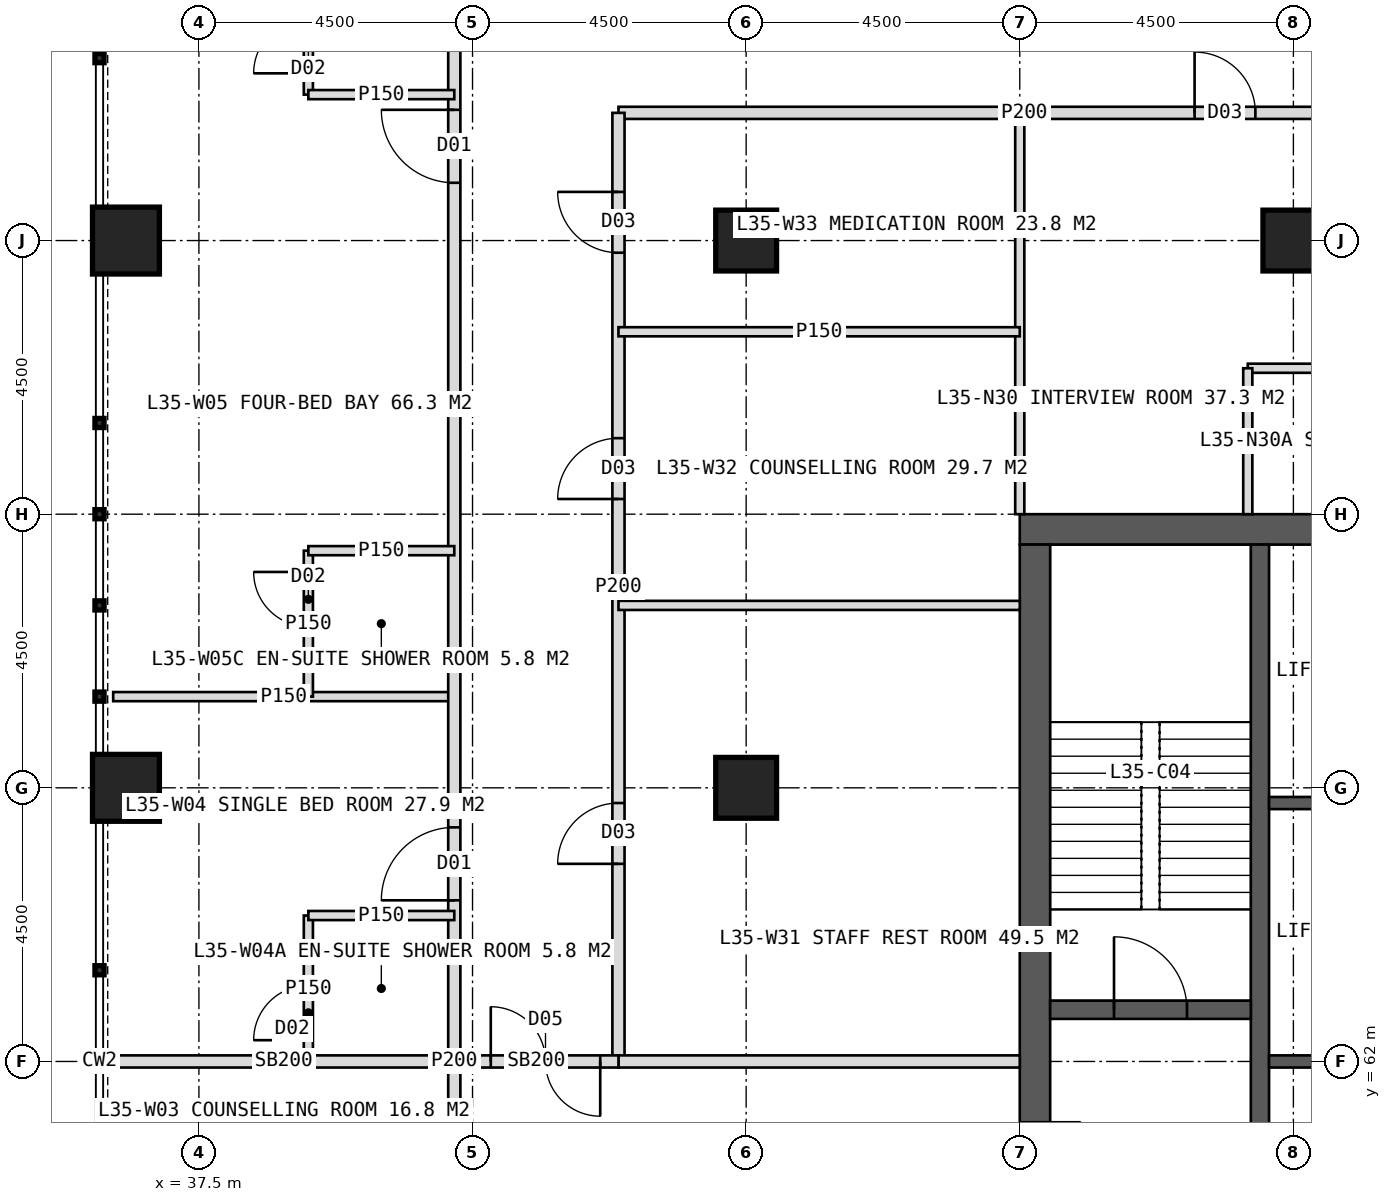
"""IFC4 building model, lengths in metres.
Left out: names, types, materials, properties, quantities, classifications, styles, units other than length and angle.
Written with IfcOpenShell. Run it as: python <this file> out.ifc"""

import sys

from ifc_helpers import new_model, si_unit, direction, frame, frame_2d, origin, origin_2d, place, context, subcontext, project, spatial, rectangle, hollow_rectangle, extrude, element, fill, save


model = new_model("IFC4")
c1 = context("Model", 3, precision=1e-05, world=origin(), true_north=direction((0.0, 1.0)))
c2 = subcontext(c1, "Body", "Model", "MODEL_VIEW")
j1 = project(units=[si_unit("LENGTHUNIT", "METRE"), si_unit("PLANEANGLEUNIT", "RADIAN")], contexts=[c1])
p1 = place(None, origin())
s1 = spatial("IfcSite", under=j1, at=p1, CompositionType="ELEMENT")
p2 = place(p1, origin())
s2 = spatial("IfcBuilding", under=s1, at=p2, CompositionType="ELEMENT")
p3 = place(p2, frame((0.0, 0.0, 148.0)))
s3 = spatial("IfcBuildingStorey", under=s2, at=p3, CompositionType="ELEMENT", Elevation=148.0)
p4 = place(p3, frame((51.0, 70.75, 0.0), z_axis=(0.0, 0.0, 1.0), x_axis=(1.0, 0.0, 0.0)))
e1 = element("IfcWall", 1, at=p4, inside=s3, PredefinedType="SHEAR", context=c2, shape_type="SweptSolid", body=[
    extrude(rectangle(XDim=18.0, YDim=0.5, at=frame_2d((9.0, 0.0))), origin(), (0.0, 0.0, 1.0), 4.0),
])
p5 = place(p4, frame((8.1, 0.0, 0.0)))
e2 = element("IfcOpeningElement", 2, at=p5, cuts=e1, PredefinedType="OPENING", context=c2, shape_type="SweptSolid", body=[
    extrude(rectangle(XDim=1.8, YDim=2.2, at=frame_2d((0.9, 1.1))), frame((0.0, 0.26, 0.0), z_axis=(0.0, -1.0, 0.0), x_axis=(1.0, 0.0, 0.0)), (0.0, 0.0, 1.0), 0.52),
])
p6 = place(p3, frame((51.25, 53.5, 0.0), z_axis=(0.0, 0.0, 1.0), x_axis=(0.0, 1.0, 0.0)))
e3 = element("IfcWall", 3, at=p6, inside=s3, PredefinedType="SHEAR", context=c2, shape_type="SweptSolid", body=[
    extrude(rectangle(XDim=17.0, YDim=0.5, at=frame_2d((8.5, 0.0))), origin(), (0.0, 0.0, 1.0), 4.0),
])
p7 = place(p6, frame((6.0, 0.0, 0.0)))
e4 = element("IfcOpeningElement", 4, at=p7, cuts=e3, PredefinedType="OPENING", context=c2, shape_type="SweptSolid", body=[
    extrude(rectangle(XDim=1.5, YDim=2.2, at=frame_2d((0.75, 1.1))), frame((0.0, 0.26, 0.0), z_axis=(0.0, -1.0, 0.0), x_axis=(1.0, 0.0, 0.0)), (0.0, 0.0, 1.0), 0.52),
])
p8 = place(p3, frame((54.95, 53.5, 0.0), z_axis=(0.0, 0.0, 1.0), x_axis=(0.0, 1.0, 0.0)))
e5 = element("IfcWall", 5, at=p8, inside=s3, PredefinedType="SHEAR", context=c2, shape_type="SweptSolid", body=[
    extrude(rectangle(XDim=17.0, YDim=0.3, at=frame_2d((8.5, 0.0))), origin(), (0.0, 0.0, 1.0), 4.0),
])
for number, where, z_axis, x_axis in (
    (6, (55.1, 62.0, 0.0), (0.0, 0.0, 1.0), (1.0, 0.0, 0.0)),
    (7, (55.1, 66.25, 0.0), (0.0, 0.0, 1.0), (1.0, 0.0, 0.0)),
):
    element("IfcWall", number, at=place(p3, frame(where, z_axis=z_axis, x_axis=x_axis)), inside=s3, PredefinedType="SHEAR", context=c2, shape_type="SweptSolid", body=[
        extrude(rectangle(XDim=3.05, YDim=0.2, at=frame_2d((1.525, 0.0))), origin(), (0.0, 0.0, 1.0), 4.0),
    ])
p9 = place(p3, frame((51.5, 62.85, 0.0), z_axis=(0.0, 0.0, 1.0), x_axis=(1.0, 0.0, 0.0)))
e8 = element("IfcWall", 8, at=p9, inside=s3, PredefinedType="SHEAR", context=c2, shape_type="SweptSolid", body=[
    extrude(rectangle(XDim=3.3, YDim=0.3, at=frame_2d((1.65, 0.0))), origin(), (0.0, 0.0, 1.0), 4.0),
])
p10 = place(p9, frame((1.05, 0.0, 0.0)))
e9 = element("IfcOpeningElement", 9, at=p10, cuts=e8, PredefinedType="OPENING", context=c2, shape_type="SweptSolid", body=[
    extrude(rectangle(XDim=1.2, YDim=2.1, at=frame_2d((0.6, 1.05))), frame((0.0, 0.16, 0.0), z_axis=(0.0, -1.0, 0.0), x_axis=(1.0, 0.0, 0.0)), (0.0, 0.0, 1.0), 0.32),
])
for number, where, z_axis, x_axis in (
    (10, (46.5, 75.5, 0.0), (0.0, 0.0, 1.0), (1.0, 0.0, 0.0)),
    (11, (55.5, 75.5, 0.0), (0.0, 0.0, 1.0), (1.0, 0.0, 0.0)),
    (12, (46.5, 66.5, 0.0), (0.0, 0.0, 1.0), (1.0, 0.0, 0.0)),
):
    element("IfcColumn", number, at=place(p3, frame(where, z_axis=z_axis, x_axis=x_axis)), inside=s3, PredefinedType="COLUMN", context=c2, shape_type="SweptSolid", body=[
        extrude(hollow_rectangle(XDim=1.0, YDim=1.0, WallThickness=0.1, at=origin_2d()), origin(), (0.0, 0.0, 1.0), 4.0),
    ])
for number, where, z_axis, x_axis in (
    (13, (36.3, 66.5, 0.0), (0.0, 0.0, 1.0), (1.0, 0.0, 0.0)),
    (14, (36.3, 75.5, 0.0), (0.0, 0.0, 1.0), (1.0, 0.0, 0.0)),
):
    element("IfcColumn", number, at=place(p3, frame(where, z_axis=z_axis, x_axis=x_axis)), inside=s3, PredefinedType="COLUMN", context=c2, shape_type="SweptSolid", body=[
        extrude(hollow_rectangle(XDim=1.1, YDim=1.1, WallThickness=0.1, at=origin_2d()), origin(), (0.0, 0.0, 1.0), 4.0),
    ])
p11 = place(p3, frame((51.0, 71.0, 0.0), z_axis=(0.0, 0.0, 1.0), x_axis=(0.0, 1.0, 0.0)))
e15 = element("IfcWall", 15, at=p11, inside=s3, PredefinedType="PARTITIONING", context=c2, shape_type="SweptSolid", body=[
    extrude(rectangle(XDim=6.6, YDim=0.15, at=frame_2d((3.3, 0.0))), origin(), (0.0, 0.0, 1.0), 3.75),
])
p12 = place(p3, frame((44.4, 77.6, 0.0), z_axis=(0.0, 0.0, 1.0), x_axis=(1.0, 0.0, 0.0)))
e16 = element("IfcWall", 16, at=p12, inside=s3, PredefinedType="PARTITIONING", context=c2, shape_type="SweptSolid", body=[
    extrude(rectangle(XDim=13.35, YDim=0.2, at=frame_2d((6.675, 0.0))), origin(), (0.0, 0.0, 1.0), 3.75),
])
p13 = place(p12, frame((9.475, 0.0, 0.0)))
e17 = element("IfcOpeningElement", 17, at=p13, cuts=e16, PredefinedType="OPENING", context=c2, shape_type="SweptSolid", body=[
    extrude(rectangle(XDim=1.0, YDim=2.1, at=frame_2d((0.5, 1.05))), frame((0.0, 0.11, 0.0), z_axis=(0.0, -1.0, 0.0), x_axis=(1.0, 0.0, 0.0)), (0.0, 0.0, 1.0), 0.22),
])
p14 = place(p3, frame((54.75, 73.4, 0.0), z_axis=(0.0, 0.0, 1.0), x_axis=(1.0, 0.0, 0.0)))
e18 = element("IfcWall", 18, at=p14, inside=s3, PredefinedType="PARTITIONING", context=c2, shape_type="SweptSolid", body=[
    extrude(rectangle(XDim=3.0, YDim=0.15, at=frame_2d((1.5, 0.0))), origin(), (0.0, 0.0, 1.0), 3.75),
])
p15 = place(p3, frame((54.75, 71.0, 0.0), z_axis=(0.0, 0.0, 1.0), x_axis=(0.0, 1.0, 0.0)))
e19 = element("IfcWall", 19, at=p15, inside=s3, PredefinedType="PARTITIONING", context=c2, shape_type="SweptSolid", body=[
    extrude(rectangle(XDim=2.4, YDim=0.15, at=frame_2d((1.2, 0.0))), origin(), (0.0, 0.0, 1.0), 3.75),
])
p16 = place(p3, frame((41.7, 62.0, 0.0), z_axis=(0.0, 0.0, 1.0), x_axis=(-1.0, 0.0, 0.0)))
e20 = element("IfcWall", 20, at=p16, inside=s3, PredefinedType="SOLIDWALL", context=c2, shape_type="SweptSolid", body=[
    extrude(rectangle(XDim=5.61, YDim=0.2, at=frame_2d((2.805, 0.0))), origin(), (0.0, 0.0, 1.0), 2.95),
])
p17 = place(p3, frame((41.7, 68.0, 0.0), z_axis=(0.0, 0.0, 1.0), x_axis=(-1.0, 0.0, 0.0)))
e21 = element("IfcWall", 21, at=p17, inside=s3, PredefinedType="PARTITIONING", context=c2, shape_type="SweptSolid", body=[
    extrude(rectangle(XDim=5.61, YDim=0.15, at=frame_2d((2.805, 0.0))), origin(), (0.0, 0.0, 1.0), 3.75),
])
p18 = place(p3, frame((41.7, 43.7, 0.0), z_axis=(0.0, 0.0, 1.0), x_axis=(0.0, 1.0, 0.0)))
e22 = element("IfcWall", 22, at=p18, inside=s3, PredefinedType="PARTITIONING", context=c2, shape_type="SweptSolid", body=[
    extrude(rectangle(XDim=36.6, YDim=0.2, at=frame_2d((18.3, 0.0))), origin(), (0.0, 0.0, 1.0), 3.75),
])
p19 = place(p18, frame((3.35, 0.0, 0.0)))
e23 = element("IfcOpeningElement", 23, at=p19, cuts=e22, PredefinedType="OPENING", context=c2, shape_type="SweptSolid", body=[
    extrude(rectangle(XDim=1.2, YDim=2.2, at=frame_2d((0.6, 1.1))), frame((0.0, 0.11, 0.0), z_axis=(0.0, -1.0, 0.0), x_axis=(1.0, 0.0, 0.0)), (0.0, 0.0, 1.0), 0.22),
])
p20 = place(p18, frame((11.05, 0.0, 0.0)))
e24 = element("IfcOpeningElement", 24, at=p20, cuts=e22, PredefinedType="OPENING", context=c2, shape_type="SweptSolid", body=[
    extrude(rectangle(XDim=1.2, YDim=2.2, at=frame_2d((0.6, 1.1))), frame((0.0, 0.11, 0.0), z_axis=(0.0, -1.0, 0.0), x_axis=(1.0, 0.0, 0.0)), (0.0, 0.0, 1.0), 0.22),
])
p21 = place(p18, frame((16.3, 0.0, 0.0)))
e25 = element("IfcOpeningElement", 25, at=p21, cuts=e22, PredefinedType="OPENING", context=c2, shape_type="SweptSolid", body=[
    extrude(rectangle(XDim=1.0, YDim=2.1, at=frame_2d((0.5, 1.05))), frame((0.0, 0.11, 0.0), z_axis=(0.0, -1.0, 0.0), x_axis=(1.0, 0.0, 0.0)), (0.0, 0.0, 1.0), 0.22),
])
p22 = place(p18, frame((20.95, 0.0, 0.0)))
e26 = element("IfcOpeningElement", 26, at=p22, cuts=e22, PredefinedType="OPENING", context=c2, shape_type="SweptSolid", body=[
    extrude(rectangle(XDim=1.2, YDim=2.2, at=frame_2d((0.6, 1.1))), frame((0.0, 0.11, 0.0), z_axis=(0.0, -1.0, 0.0), x_axis=(1.0, 0.0, 0.0)), (0.0, 0.0, 1.0), 0.22),
])
p23 = place(p18, frame((32.75, 0.0, 0.0)))
e27 = element("IfcOpeningElement", 27, at=p23, cuts=e22, PredefinedType="OPENING", context=c2, shape_type="SweptSolid", body=[
    extrude(rectangle(XDim=1.2, YDim=2.2, at=frame_2d((0.6, 1.1))), frame((0.0, 0.11, 0.0), z_axis=(0.0, -1.0, 0.0), x_axis=(1.0, 0.0, 0.0)), (0.0, 0.0, 1.0), 0.22),
])
p24 = place(p3, frame((39.3, 62.0, 0.0), z_axis=(0.0, 0.0, 1.0), x_axis=(0.0, 1.0, 0.0)))
e28 = element("IfcWall", 28, at=p24, inside=s3, PredefinedType="PARTITIONING", context=c2, shape_type="SweptSolid", body=[
    extrude(rectangle(XDim=2.4, YDim=0.15, at=frame_2d((1.2, 0.0))), origin(), (0.0, 0.0, 1.0), 3.75),
])
p25 = place(p24, frame((0.35, 0.0, 0.0)))
e29 = element("IfcOpeningElement", 29, at=p25, cuts=e28, PredefinedType="OPENING", context=c2, shape_type="SweptSolid", body=[
    extrude(rectangle(XDim=0.9, YDim=2.1, at=frame_2d((0.45, 1.05))), frame((0.0, 0.085, 0.0), z_axis=(0.0, -1.0, 0.0), x_axis=(1.0, 0.0, 0.0)), (0.0, 0.0, 1.0), 0.17),
])
p26 = place(p3, frame((41.7, 64.4, 0.0), z_axis=(0.0, 0.0, 1.0), x_axis=(-1.0, 0.0, 0.0)))
e30 = element("IfcWall", 30, at=p26, inside=s3, PredefinedType="PARTITIONING", context=c2, shape_type="SweptSolid", body=[
    extrude(rectangle(XDim=2.4, YDim=0.15, at=frame_2d((1.2, 0.0))), origin(), (0.0, 0.0, 1.0), 3.75),
])
p27 = place(p3, frame((39.3, 77.9, 0.0), z_axis=(0.0, 0.0, 1.0), x_axis=(0.0, 1.0, 0.0)))
e31 = element("IfcWall", 31, at=p27, inside=s3, PredefinedType="PARTITIONING", context=c2, shape_type="SweptSolid", body=[
    extrude(rectangle(XDim=2.4, YDim=0.15, at=frame_2d((1.2, 0.0))), origin(), (0.0, 0.0, 1.0), 3.75),
])
p28 = place(p27, frame((0.35, 0.0, 0.0)))
e32 = element("IfcOpeningElement", 32, at=p28, cuts=e31, PredefinedType="OPENING", context=c2, shape_type="SweptSolid", body=[
    extrude(rectangle(XDim=0.9, YDim=2.1, at=frame_2d((0.45, 1.05))), frame((0.0, 0.085, 0.0), z_axis=(0.0, -1.0, 0.0), x_axis=(1.0, 0.0, 0.0)), (0.0, 0.0, 1.0), 0.17),
])
p29 = place(p3, frame((41.7, 77.9, 0.0), z_axis=(0.0, 0.0, 1.0), x_axis=(-1.0, 0.0, 0.0)))
e33 = element("IfcWall", 33, at=p29, inside=s3, PredefinedType="PARTITIONING", context=c2, shape_type="SweptSolid", body=[
    extrude(rectangle(XDim=2.4, YDim=0.15, at=frame_2d((1.2, 0.0))), origin(), (0.0, 0.0, 1.0), 3.75),
])
p30 = place(p3, frame((39.3, 68.0, 0.0), z_axis=(0.0, 0.0, 1.0), x_axis=(0.0, 1.0, 0.0)))
e34 = element("IfcWall", 34, at=p30, inside=s3, PredefinedType="PARTITIONING", context=c2, shape_type="SweptSolid", body=[
    extrude(rectangle(XDim=2.4, YDim=0.15, at=frame_2d((1.2, 0.0))), origin(), (0.0, 0.0, 1.0), 3.75),
])
p31 = place(p30, frame((1.15, 0.0, 0.0)))
e35 = element("IfcOpeningElement", 35, at=p31, cuts=e34, PredefinedType="OPENING", context=c2, shape_type="SweptSolid", body=[
    extrude(rectangle(XDim=0.9, YDim=2.1, at=frame_2d((0.45, 1.05))), frame((0.0, 0.085, 0.0), z_axis=(0.0, -1.0, 0.0), x_axis=(1.0, 0.0, 0.0)), (0.0, 0.0, 1.0), 0.17),
])
p32 = place(p3, frame((41.7, 70.4, 0.0), z_axis=(0.0, 0.0, 1.0), x_axis=(-1.0, 0.0, 0.0)))
e36 = element("IfcWall", 36, at=p32, inside=s3, PredefinedType="PARTITIONING", context=c2, shape_type="SweptSolid", body=[
    extrude(rectangle(XDim=2.4, YDim=0.15, at=frame_2d((1.2, 0.0))), origin(), (0.0, 0.0, 1.0), 3.75),
])
p33 = place(p3, frame((44.4, 62.0, 0.0), z_axis=(0.0, 0.0, 1.0), x_axis=(0.0, 1.0, 0.0)))
e37 = element("IfcWall", 37, at=p33, inside=s3, PredefinedType="PARTITIONING", context=c2, shape_type="SweptSolid", body=[
    extrude(rectangle(XDim=15.6, YDim=0.2, at=frame_2d((7.8, 0.0))), origin(), (0.0, 0.0, 1.0), 3.75),
])
p34 = place(p33, frame((3.25, 0.0, 0.0)))
e38 = element("IfcOpeningElement", 38, at=p34, cuts=e37, PredefinedType="OPENING", context=c2, shape_type="SweptSolid", body=[
    extrude(rectangle(XDim=1.0, YDim=2.1, at=frame_2d((0.5, 1.05))), frame((0.0, 0.11, 0.0), z_axis=(0.0, -1.0, 0.0), x_axis=(1.0, 0.0, 0.0)), (0.0, 0.0, 1.0), 0.22),
])
p35 = place(p33, frame((9.25, 0.0, 0.0)))
e39 = element("IfcOpeningElement", 39, at=p35, cuts=e37, PredefinedType="OPENING", context=c2, shape_type="SweptSolid", body=[
    extrude(rectangle(XDim=1.0, YDim=2.1, at=frame_2d((0.5, 1.05))), frame((0.0, 0.11, 0.0), z_axis=(0.0, -1.0, 0.0), x_axis=(1.0, 0.0, 0.0)), (0.0, 0.0, 1.0), 0.22),
])
p36 = place(p33, frame((13.3, 0.0, 0.0)))
e40 = element("IfcOpeningElement", 40, at=p36, cuts=e37, PredefinedType="OPENING", context=c2, shape_type="SweptSolid", body=[
    extrude(rectangle(XDim=1.0, YDim=2.1, at=frame_2d((0.5, 1.05))), frame((0.0, 0.11, 0.0), z_axis=(0.0, -1.0, 0.0), x_axis=(1.0, 0.0, 0.0)), (0.0, 0.0, 1.0), 0.22),
])
p37 = place(p3, frame((51.0, 62.0, 0.0), z_axis=(0.0, 0.0, 1.0), x_axis=(-1.0, 0.0, 0.0)))
e41 = element("IfcWall", 41, at=p37, inside=s3, PredefinedType="SOLIDWALL", context=c2, shape_type="SweptSolid", body=[
    extrude(rectangle(XDim=6.6, YDim=0.2, at=frame_2d((3.3, 0.0))), origin(), (0.0, 0.0, 1.0), 2.95),
])
for number, where, z_axis, x_axis in (
    (42, (51.0, 69.5, 0.0), (0.0, 0.0, 1.0), (-1.0, 0.0, 0.0)),
    (43, (51.0, 74.0, 0.0), (0.0, 0.0, 1.0), (-1.0, 0.0, 0.0)),
):
    element("IfcWall", number, at=place(p3, frame(where, z_axis=z_axis, x_axis=x_axis)), inside=s3, PredefinedType="PARTITIONING", context=c2, shape_type="SweptSolid", body=[
        extrude(rectangle(XDim=6.6, YDim=0.15, at=frame_2d((3.3, 0.0))), origin(), (0.0, 0.0, 1.0), 3.75),
    ])
p38 = place(p3, frame((44.4, 62.0, 0.0), z_axis=(0.0, 0.0, 1.0), x_axis=(-1.0, 0.0, 0.0)))
e44 = element("IfcWall", 44, at=p38, inside=s3, PredefinedType="SOLIDWALL", context=c2, shape_type="SweptSolid", body=[
    extrude(rectangle(XDim=2.7, YDim=0.2, at=frame_2d((1.35, 0.0))), origin(), (0.0, 0.0, 1.0), 2.95),
])
p39 = place(p38, frame((0.3, 0.0, 0.0)))
e45 = element("IfcOpeningElement", 45, at=p39, cuts=e44, PredefinedType="OPENING", context=c2, shape_type="SweptSolid", body=[
    extrude(rectangle(XDim=1.8, YDim=2.2, at=frame_2d((0.9, 1.1))), frame((0.0, 0.11, 0.0), z_axis=(0.0, -1.0, 0.0), x_axis=(1.0, 0.0, 0.0)), (0.0, 0.0, 1.0), 0.22),
])
p40 = place(p13, origin())
e46 = element("IfcDoor", 46, at=p40, inside=s3, OperationType="SINGLE_SWING_LEFT", PredefinedType="DOOR", context=c2, shape_type="SweptSolid", body=[
    extrude(rectangle(XDim=1.0, YDim=2.1, at=frame_2d((0.5, 1.05))), frame((0.0, 0.025, 0.0), z_axis=(0.0, -1.0, 0.0), x_axis=(1.0, 0.0, 0.0)), (0.0, 0.0, 1.0), 0.05),
])
fill(e17, e46)
p41 = place(p22, origin())
e47 = element("IfcDoor", 47, at=p41, inside=s3, OperationType="SINGLE_SWING_LEFT", PredefinedType="DOOR", context=c2, shape_type="SweptSolid", body=[
    extrude(rectangle(XDim=1.2, YDim=2.2, at=frame_2d((0.6, 1.1))), frame((0.0, 0.025, 0.0), z_axis=(0.0, -1.0, 0.0), x_axis=(1.0, 0.0, 0.0)), (0.0, 0.0, 1.0), 0.05),
])
fill(e26, e47)
p42 = place(p25, origin())
e48 = element("IfcDoor", 48, at=p42, inside=s3, OperationType="SINGLE_SWING_LEFT", PredefinedType="DOOR", context=c2, shape_type="SweptSolid", body=[
    extrude(rectangle(XDim=0.9, YDim=2.1, at=frame_2d((0.45, 1.05))), frame((0.0, 0.025, 0.0), z_axis=(0.0, -1.0, 0.0), x_axis=(1.0, 0.0, 0.0)), (0.0, 0.0, 1.0), 0.05),
])
fill(e29, e48)
p43 = place(p23, origin())
e49 = element("IfcDoor", 49, at=p43, inside=s3, OperationType="SINGLE_SWING_RIGHT", PredefinedType="DOOR", context=c2, shape_type="SweptSolid", body=[
    extrude(rectangle(XDim=1.2, YDim=2.2, at=frame_2d((0.6, 1.1))), frame((0.0, 0.025, 0.0), z_axis=(0.0, -1.0, 0.0), x_axis=(1.0, 0.0, 0.0)), (0.0, 0.0, 1.0), 0.05),
])
fill(e27, e49)
p44 = place(p28, origin())
e50 = element("IfcDoor", 50, at=p44, inside=s3, OperationType="SINGLE_SWING_LEFT", PredefinedType="DOOR", context=c2, shape_type="SweptSolid", body=[
    extrude(rectangle(XDim=0.9, YDim=2.1, at=frame_2d((0.45, 1.05))), frame((0.0, 0.025, 0.0), z_axis=(0.0, -1.0, 0.0), x_axis=(1.0, 0.0, 0.0)), (0.0, 0.0, 1.0), 0.05),
])
fill(e32, e50)
p45 = place(p31, origin())
e51 = element("IfcDoor", 51, at=p45, inside=s3, OperationType="SINGLE_SWING_RIGHT", PredefinedType="DOOR", context=c2, shape_type="SweptSolid", body=[
    extrude(rectangle(XDim=0.9, YDim=2.1, at=frame_2d((0.45, 1.05))), frame((0.0, 0.025, 0.0), z_axis=(0.0, -1.0, 0.0), x_axis=(1.0, 0.0, 0.0)), (0.0, 0.0, 1.0), 0.05),
])
fill(e35, e51)
p46 = place(p34, origin())
e52 = element("IfcDoor", 52, at=p46, inside=s3, OperationType="SINGLE_SWING_LEFT", PredefinedType="DOOR", context=c2, shape_type="SweptSolid", body=[
    extrude(rectangle(XDim=1.0, YDim=2.1, at=frame_2d((0.5, 1.05))), frame((0.0, 0.025, 0.0), z_axis=(0.0, -1.0, 0.0), x_axis=(1.0, 0.0, 0.0)), (0.0, 0.0, 1.0), 0.05),
])
fill(e38, e52)
p47 = place(p35, origin())
e53 = element("IfcDoor", 53, at=p47, inside=s3, OperationType="SINGLE_SWING_LEFT", PredefinedType="DOOR", context=c2, shape_type="SweptSolid", body=[
    extrude(rectangle(XDim=1.0, YDim=2.1, at=frame_2d((0.5, 1.05))), frame((0.0, 0.025, 0.0), z_axis=(0.0, -1.0, 0.0), x_axis=(1.0, 0.0, 0.0)), (0.0, 0.0, 1.0), 0.05),
])
fill(e39, e53)
p48 = place(p36, origin())
e54 = element("IfcDoor", 54, at=p48, inside=s3, OperationType="SINGLE_SWING_RIGHT", PredefinedType="DOOR", context=c2, shape_type="SweptSolid", body=[
    extrude(rectangle(XDim=1.0, YDim=2.1, at=frame_2d((0.5, 1.05))), frame((0.0, 0.025, 0.0), z_axis=(0.0, -1.0, 0.0), x_axis=(1.0, 0.0, 0.0)), (0.0, 0.0, 1.0), 0.05),
])
fill(e40, e54)
p49 = place(p39, origin())
e55 = element("IfcDoor", 55, at=p49, inside=s3, OperationType="DOUBLE_DOOR_DOUBLE_SWING", PredefinedType="DOOR", context=c2, shape_type="SweptSolid", body=[
    extrude(rectangle(XDim=1.8, YDim=2.2, at=frame_2d((0.9, 1.1))), frame((0.0, 0.025, 0.0), z_axis=(0.0, -1.0, 0.0), x_axis=(1.0, 0.0, 0.0)), (0.0, 0.0, 1.0), 0.05),
])
fill(e45, e55)
p50 = place(p10, origin())
e56 = element("IfcDoor", 56, at=p50, inside=s3, OperationType="SINGLE_SWING_LEFT", PredefinedType="DOOR", context=c2, shape_type="SweptSolid", body=[
    extrude(rectangle(XDim=1.2, YDim=2.1, at=frame_2d((0.6, 1.05))), frame((0.0, 0.025, 0.0), z_axis=(0.0, -1.0, 0.0), x_axis=(1.0, 0.0, 0.0)), (0.0, 0.0, 1.0), 0.05),
])
fill(e9, e56)
save(model, sys.argv[1])
